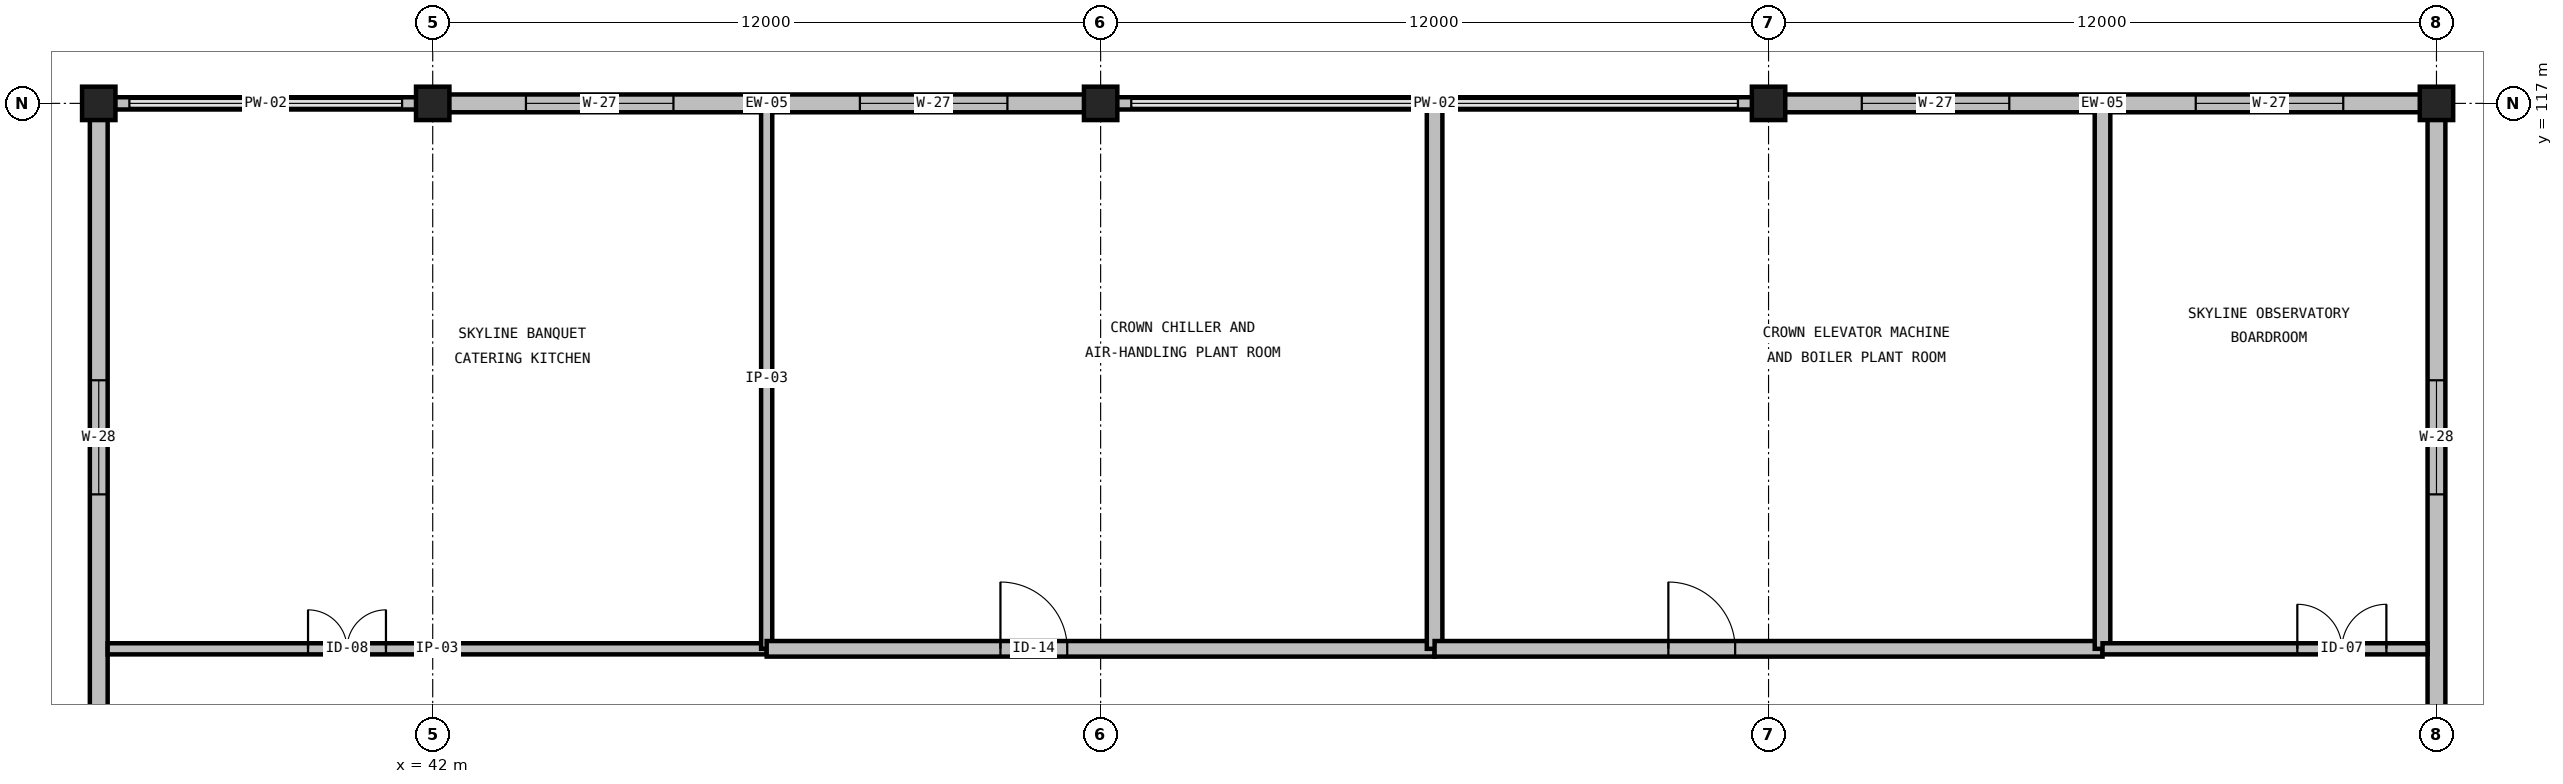
"""IFC4 building model, lengths in metres.
Left out: names, types, materials, properties, quantities, classifications, styles, units other than length and angle.
Written with IfcOpenShell. Run it as: python <this file> out.ifc"""

import sys

from ifc_helpers import new_model, si_unit, direction, frame, frame_2d, origin, origin_2d, place, context, subcontext, project, spatial, rectangle, extrude, element, fill, save


model = new_model("IFC4")
c1 = context("Model", 3, precision=1e-05, world=origin(), true_north=direction((0.0, 1.0)))
c2 = subcontext(c1, "Body", "Model", "MODEL_VIEW")
j1 = project(units=[si_unit("LENGTHUNIT", "METRE"), si_unit("PLANEANGLEUNIT", "RADIAN")], contexts=[c1])
p1 = place(None, origin())
s1 = spatial("IfcSite", under=j1, at=p1, CompositionType="ELEMENT")
p2 = place(p1, origin())
s2 = spatial("IfcBuilding", under=s1, at=p2, CompositionType="ELEMENT")
p3 = place(p2, frame((0.0, 0.0, 70.8)))
s3 = spatial("IfcBuildingStorey", under=s2, at=p3, CompositionType="ELEMENT", Elevation=70.8)
for number, where, z_axis, x_axis in (
    (1, (36.0, 117.0, 0.0), (0.0, 0.0, 1.0), (1.0, 0.0, 0.0)),
    (2, (42.0, 117.0, 0.0), (0.0, 0.0, 1.0), (1.0, 0.0, 0.0)),
    (3, (54.0, 117.0, 0.0), (0.0, 0.0, 1.0), (1.0, 0.0, 0.0)),
    (4, (66.0, 117.0, 0.0), (0.0, 0.0, 1.0), (1.0, 0.0, 0.0)),
    (5, (78.0, 117.0, 0.0), (0.0, 0.0, 1.0), (1.0, 0.0, 0.0)),
):
    element("IfcColumn", number, at=place(p3, frame(where, z_axis=z_axis, x_axis=x_axis)), inside=s3, PredefinedType="COLUMN", context=c2, shape_type="SweptSolid", body=[
        extrude(rectangle(XDim=0.6, YDim=0.6, at=origin_2d()), origin(), (0.0, 0.0, 1.0), 4.8),
    ])
p4 = place(p3, frame((42.0, 117.0, 0.0), z_axis=(0.0, 0.0, 1.0), x_axis=(-1.0, 0.0, 0.0)))
e6 = element("IfcWall", 6, at=p4, inside=s3, PredefinedType="PARAPET", context=c2, shape_type="SweptSolid", body=[
    extrude(rectangle(XDim=6.0, YDim=0.22, at=frame_2d((3.0, 0.0))), origin(), (0.0, 0.0, 1.0), 0.2),
])
p5 = place(p3, frame((54.0, 117.0, 0.0), z_axis=(0.0, 0.0, 1.0), x_axis=(-1.0, 0.0, 0.0)))
e7 = element("IfcWall", 7, at=p5, inside=s3, PredefinedType="STANDARD", context=c2, shape_type="SweptSolid", body=[
    extrude(rectangle(XDim=12.0, YDim=0.32, at=frame_2d((6.0, 0.0))), origin(), (0.0, 0.0, 1.0), 3.726),
])
p6 = place(p5, frame((1.675, 0.0, 0.8)))
e8 = element("IfcOpeningElement", 8, at=p6, cuts=e7, PredefinedType="OPENING", context=c2, shape_type="SweptSolid", body=[
    extrude(rectangle(XDim=2.65, YDim=2.1, at=frame_2d((1.325, 1.05))), frame((0.0, 0.175, 0.0), z_axis=(0.0, -1.0, 0.0), x_axis=(1.0, 0.0, 0.0)), (0.0, 0.0, 1.0), 0.35),
])
p7 = place(p5, frame((7.675, 0.0, 0.8)))
e9 = element("IfcOpeningElement", 9, at=p7, cuts=e7, PredefinedType="OPENING", context=c2, shape_type="SweptSolid", body=[
    extrude(rectangle(XDim=2.65, YDim=2.1, at=frame_2d((1.325, 1.05))), frame((0.0, 0.175, 0.0), z_axis=(0.0, -1.0, 0.0), x_axis=(1.0, 0.0, 0.0)), (0.0, 0.0, 1.0), 0.35),
])
p8 = place(p3, frame((66.0, 117.0, 0.0), z_axis=(0.0, 0.0, 1.0), x_axis=(-1.0, 0.0, 0.0)))
e10 = element("IfcWall", 10, at=p8, inside=s3, PredefinedType="PARAPET", context=c2, shape_type="SweptSolid", body=[
    extrude(rectangle(XDim=12.0, YDim=0.22, at=frame_2d((6.0, 0.0))), origin(), (0.0, 0.0, 1.0), 0.2),
])
p9 = place(p3, frame((78.0, 117.0, 0.0), z_axis=(0.0, 0.0, 1.0), x_axis=(-1.0, 0.0, 0.0)))
e11 = element("IfcWall", 11, at=p9, inside=s3, PredefinedType="STANDARD", context=c2, shape_type="SweptSolid", body=[
    extrude(rectangle(XDim=12.0, YDim=0.32, at=frame_2d((6.0, 0.0))), origin(), (0.0, 0.0, 1.0), 3.726),
])
p10 = place(p9, frame((1.675, 0.0, 0.8)))
e12 = element("IfcOpeningElement", 12, at=p10, cuts=e11, PredefinedType="OPENING", context=c2, shape_type="SweptSolid", body=[
    extrude(rectangle(XDim=2.65, YDim=2.1, at=frame_2d((1.325, 1.05))), frame((0.0, 0.175, 0.0), z_axis=(0.0, -1.0, 0.0), x_axis=(1.0, 0.0, 0.0)), (0.0, 0.0, 1.0), 0.35),
])
p11 = place(p9, frame((7.675, 0.0, 0.8)))
e13 = element("IfcOpeningElement", 13, at=p11, cuts=e11, PredefinedType="OPENING", context=c2, shape_type="SweptSolid", body=[
    extrude(rectangle(XDim=2.65, YDim=2.1, at=frame_2d((1.325, 1.05))), frame((0.0, 0.175, 0.0), z_axis=(0.0, -1.0, 0.0), x_axis=(1.0, 0.0, 0.0)), (0.0, 0.0, 1.0), 0.35),
])
p12 = place(p3, frame((36.0, 117.0, 0.0), z_axis=(0.0, 0.0, 1.0), x_axis=(0.0, -1.0, 0.0)))
e14 = element("IfcWall", 14, at=p12, inside=s3, PredefinedType="STANDARD", context=c2, shape_type="SweptSolid", body=[
    extrude(rectangle(XDim=12.0, YDim=0.32, at=frame_2d((6.0, 0.0))), origin(), (0.0, 0.0, 1.0), 4.171),
])
p13 = place(p12, frame((4.975, 0.0, 0.85)))
e15 = element("IfcOpeningElement", 15, at=p13, cuts=e14, PredefinedType="OPENING", context=c2, shape_type="SweptSolid", body=[
    extrude(rectangle(XDim=2.05, YDim=2.1, at=frame_2d((1.025, 1.05))), frame((0.0, 0.175, 0.0), z_axis=(0.0, -1.0, 0.0), x_axis=(1.0, 0.0, 0.0)), (0.0, 0.0, 1.0), 0.35),
])
p14 = place(p3, frame((78.0, 105.0, 0.0), z_axis=(0.0, 0.0, 1.0), x_axis=(0.0, 1.0, 0.0)))
e16 = element("IfcWall", 16, at=p14, inside=s3, PredefinedType="STANDARD", context=c2, shape_type="SweptSolid", body=[
    extrude(rectangle(XDim=12.0, YDim=0.32, at=frame_2d((6.0, 0.0))), origin(), (0.0, 0.0, 1.0), 4.171),
])
p15 = place(p14, frame((4.975, 0.0, 0.85)))
e17 = element("IfcOpeningElement", 17, at=p15, cuts=e16, PredefinedType="OPENING", context=c2, shape_type="SweptSolid", body=[
    extrude(rectangle(XDim=2.05, YDim=2.1, at=frame_2d((1.025, 1.05))), frame((0.0, 0.175, 0.0), z_axis=(0.0, -1.0, 0.0), x_axis=(1.0, 0.0, 0.0)), (0.0, 0.0, 1.0), 0.35),
])
p16 = place(p3, frame((77.86, 84.28, 4.8), z_axis=(0.0, 0.0, 1.0), x_axis=(0.0, 1.0, 0.0)))
e18 = element("IfcWall", 18, at=p16, inside=s3, PredefinedType="PARAPET", context=c2, shape_type="SweptSolid", body=[
    extrude(rectangle(XDim=32.44, YDim=0.28, at=frame_2d((16.22, 0.0))), origin(), (0.0, 0.0, 1.0), 1.2),
])
p17 = place(p3, frame((78.0, 116.86, 4.8), z_axis=(0.0, 0.0, 1.0), x_axis=(-1.0, 0.0, 0.0)))
e19 = element("IfcWall", 19, at=p17, inside=s3, PredefinedType="PARAPET", context=c2, shape_type="SweptSolid", body=[
    extrude(rectangle(XDim=42.0, YDim=0.28, at=frame_2d((21.0, 0.0))), origin(), (0.0, 0.0, 1.0), 1.2),
])
p18 = place(p3, frame((36.14, 116.72, 4.8), z_axis=(0.0, 0.0, 1.0), x_axis=(0.0, -1.0, 0.0)))
e20 = element("IfcWall", 20, at=p18, inside=s3, PredefinedType="PARAPET", context=c2, shape_type="SweptSolid", body=[
    extrude(rectangle(XDim=32.44, YDim=0.28, at=frame_2d((16.22, 0.0))), origin(), (0.0, 0.0, 1.0), 1.2),
])
p19 = place(p3, frame((36.16, 107.2, 0.0), z_axis=(0.0, 0.0, 1.0), x_axis=(1.0, 0.0, 0.0)))
e21 = element("IfcWall", 21, at=p19, inside=s3, PredefinedType="PARTITIONING", context=c2, shape_type="SweptSolid", body=[
    extrude(rectangle(XDim=11.84, YDim=0.2, at=frame_2d((5.92, 0.0))), origin(), (0.0, 0.0, 1.0), 4.48),
])
p20 = place(p19, frame((3.6, 0.0, 0.0)))
e22 = element("IfcOpeningElement", 22, at=p20, cuts=e21, PredefinedType="OPENING", context=c2, shape_type="SweptSolid", body=[
    extrude(rectangle(XDim=1.4, YDim=2.2, at=frame_2d((0.7, 1.1))), frame((0.0, 0.115, 0.0), z_axis=(0.0, -1.0, 0.0), x_axis=(1.0, 0.0, 0.0)), (0.0, 0.0, 1.0), 0.23),
])
p21 = place(p3, frame((48.0, 107.2, 0.0), z_axis=(0.0, 0.0, 1.0), x_axis=(0.0, 1.0, 0.0)))
e23 = element("IfcWall", 23, at=p21, inside=s3, PredefinedType="PARTITIONING", context=c2, shape_type="SweptSolid", body=[
    extrude(rectangle(XDim=9.715, YDim=0.2, at=frame_2d((4.857, 0.0))), origin(), (0.0, 0.0, 1.0), 4.48),
])
p22 = place(p3, frame((48.0, 107.2, 0.0), z_axis=(0.0, 0.0, 1.0), x_axis=(1.0, 0.0, 0.0)))
e24 = element("IfcWall", 24, at=p22, inside=s3, PredefinedType="PARTITIONING", context=c2, shape_type="SweptSolid", body=[
    extrude(rectangle(XDim=12.0, YDim=0.28, at=frame_2d((6.0, 0.0))), origin(), (0.0, 0.0, 1.0), 4.48),
])
p23 = place(p22, frame((4.2, 0.0, 0.0)))
e25 = element("IfcOpeningElement", 25, at=p23, cuts=e24, PredefinedType="OPENING", context=c2, shape_type="SweptSolid", body=[
    extrude(rectangle(XDim=1.2, YDim=2.2, at=frame_2d((0.6, 1.1))), frame((0.0, 0.155, 0.0), z_axis=(0.0, -1.0, 0.0), x_axis=(1.0, 0.0, 0.0)), (0.0, 0.0, 1.0), 0.31),
])
p24 = place(p3, frame((60.0, 107.2, 0.0), z_axis=(0.0, 0.0, 1.0), x_axis=(0.0, 1.0, 0.0)))
e26 = element("IfcWall", 26, at=p24, inside=s3, PredefinedType="PARTITIONING", context=c2, shape_type="SweptSolid", body=[
    extrude(rectangle(XDim=9.715, YDim=0.28, at=frame_2d((4.857, 0.0))), origin(), (0.0, 0.0, 1.0), 4.48),
])
p25 = place(p3, frame((60.0, 107.2, 0.0), z_axis=(0.0, 0.0, 1.0), x_axis=(1.0, 0.0, 0.0)))
e27 = element("IfcWall", 27, at=p25, inside=s3, PredefinedType="PARTITIONING", context=c2, shape_type="SweptSolid", body=[
    extrude(rectangle(XDim=12.0, YDim=0.28, at=frame_2d((6.0, 0.0))), origin(), (0.0, 0.0, 1.0), 4.48),
])
p26 = place(p25, frame((4.2, 0.0, 0.0)))
e28 = element("IfcOpeningElement", 28, at=p26, cuts=e27, PredefinedType="OPENING", context=c2, shape_type="SweptSolid", body=[
    extrude(rectangle(XDim=1.2, YDim=2.2, at=frame_2d((0.6, 1.1))), frame((0.0, 0.155, 0.0), z_axis=(0.0, -1.0, 0.0), x_axis=(1.0, 0.0, 0.0)), (0.0, 0.0, 1.0), 0.31),
])
p27 = place(p3, frame((72.0, 107.2, 0.0), z_axis=(0.0, 0.0, 1.0), x_axis=(0.0, 1.0, 0.0)))
e29 = element("IfcWall", 29, at=p27, inside=s3, PredefinedType="PARTITIONING", context=c2, shape_type="SweptSolid", body=[
    extrude(rectangle(XDim=9.715, YDim=0.28, at=frame_2d((4.857, 0.0))), origin(), (0.0, 0.0, 1.0), 4.48),
])
p28 = place(p3, frame((72.0, 107.2, 0.0), z_axis=(0.0, 0.0, 1.0), x_axis=(1.0, 0.0, 0.0)))
e30 = element("IfcWall", 30, at=p28, inside=s3, PredefinedType="PARTITIONING", context=c2, shape_type="SweptSolid", body=[
    extrude(rectangle(XDim=5.84, YDim=0.2, at=frame_2d((2.92, 0.0))), origin(), (0.0, 0.0, 1.0), 4.48),
])
p29 = place(p28, frame((3.5, 0.0, 0.0)))
e31 = element("IfcOpeningElement", 31, at=p29, cuts=e30, PredefinedType="OPENING", context=c2, shape_type="SweptSolid", body=[
    extrude(rectangle(XDim=1.6, YDim=2.25, at=frame_2d((0.8, 1.125))), frame((0.0, 0.115, 0.0), z_axis=(0.0, -1.0, 0.0), x_axis=(1.0, 0.0, 0.0)), (0.0, 0.0, 1.0), 0.23),
])
p30 = place(p6, origin())
e32 = element("IfcWindow", 32, at=p30, inside=s3, PartitioningType="DOUBLE_PANEL_VERTICAL", PredefinedType="WINDOW", context=c2, shape_type="SweptSolid", body=[
    extrude(rectangle(XDim=2.65, YDim=2.1, at=frame_2d((1.325, 1.05))), frame((0.0, 0.03, 0.0), z_axis=(0.0, -1.0, 0.0), x_axis=(1.0, 0.0, 0.0)), (0.0, 0.0, 1.0), 0.06),
])
fill(e8, e32)
p31 = place(p7, origin())
e33 = element("IfcWindow", 33, at=p31, inside=s3, PartitioningType="DOUBLE_PANEL_VERTICAL", PredefinedType="WINDOW", context=c2, shape_type="SweptSolid", body=[
    extrude(rectangle(XDim=2.65, YDim=2.1, at=frame_2d((1.325, 1.05))), frame((0.0, 0.03, 0.0), z_axis=(0.0, -1.0, 0.0), x_axis=(1.0, 0.0, 0.0)), (0.0, 0.0, 1.0), 0.06),
])
fill(e9, e33)
p32 = place(p10, origin())
e34 = element("IfcWindow", 34, at=p32, inside=s3, PartitioningType="DOUBLE_PANEL_VERTICAL", PredefinedType="WINDOW", context=c2, shape_type="SweptSolid", body=[
    extrude(rectangle(XDim=2.65, YDim=2.1, at=frame_2d((1.325, 1.05))), frame((0.0, 0.03, 0.0), z_axis=(0.0, -1.0, 0.0), x_axis=(1.0, 0.0, 0.0)), (0.0, 0.0, 1.0), 0.06),
])
fill(e12, e34)
p33 = place(p11, origin())
e35 = element("IfcWindow", 35, at=p33, inside=s3, PartitioningType="DOUBLE_PANEL_VERTICAL", PredefinedType="WINDOW", context=c2, shape_type="SweptSolid", body=[
    extrude(rectangle(XDim=2.65, YDim=2.1, at=frame_2d((1.325, 1.05))), frame((0.0, 0.03, 0.0), z_axis=(0.0, -1.0, 0.0), x_axis=(1.0, 0.0, 0.0)), (0.0, 0.0, 1.0), 0.06),
])
fill(e13, e35)
p34 = place(p13, origin())
e36 = element("IfcWindow", 36, at=p34, inside=s3, PartitioningType="DOUBLE_PANEL_VERTICAL", PredefinedType="WINDOW", context=c2, shape_type="SweptSolid", body=[
    extrude(rectangle(XDim=2.05, YDim=2.1, at=frame_2d((1.025, 1.05))), frame((0.0, 0.03, 0.0), z_axis=(0.0, -1.0, 0.0), x_axis=(1.0, 0.0, 0.0)), (0.0, 0.0, 1.0), 0.06),
])
fill(e15, e36)
p35 = place(p15, origin())
e37 = element("IfcWindow", 37, at=p35, inside=s3, PartitioningType="DOUBLE_PANEL_VERTICAL", PredefinedType="WINDOW", context=c2, shape_type="SweptSolid", body=[
    extrude(rectangle(XDim=2.05, YDim=2.1, at=frame_2d((1.025, 1.05))), frame((0.0, 0.03, 0.0), z_axis=(0.0, -1.0, 0.0), x_axis=(1.0, 0.0, 0.0)), (0.0, 0.0, 1.0), 0.06),
])
fill(e17, e37)
p36 = place(p20, origin())
e38 = element("IfcDoor", 38, at=p36, inside=s3, OperationType="DOUBLE_DOOR_SINGLE_SWING", PredefinedType="DOOR", context=c2, shape_type="SweptSolid", body=[
    extrude(rectangle(XDim=1.4, YDim=2.2, at=frame_2d((0.7, 1.1))), frame((0.0, 0.025, 0.0), z_axis=(0.0, -1.0, 0.0), x_axis=(1.0, 0.0, 0.0)), (0.0, 0.0, 1.0), 0.05),
])
fill(e22, e38)
p37 = place(p23, origin())
e39 = element("IfcDoor", 39, at=p37, inside=s3, OperationType="SINGLE_SWING_LEFT", PredefinedType="DOOR", context=c2, shape_type="SweptSolid", body=[
    extrude(rectangle(XDim=1.2, YDim=2.2, at=frame_2d((0.6, 1.1))), frame((0.0, 0.025, 0.0), z_axis=(0.0, -1.0, 0.0), x_axis=(1.0, 0.0, 0.0)), (0.0, 0.0, 1.0), 0.05),
])
fill(e25, e39)
p38 = place(p26, origin())
e40 = element("IfcDoor", 40, at=p38, inside=s3, OperationType="SINGLE_SWING_LEFT", PredefinedType="DOOR", context=c2, shape_type="SweptSolid", body=[
    extrude(rectangle(XDim=1.2, YDim=2.2, at=frame_2d((0.6, 1.1))), frame((0.0, 0.025, 0.0), z_axis=(0.0, -1.0, 0.0), x_axis=(1.0, 0.0, 0.0)), (0.0, 0.0, 1.0), 0.05),
])
fill(e28, e40)
p39 = place(p29, origin())
e41 = element("IfcDoor", 41, at=p39, inside=s3, OperationType="DOUBLE_DOOR_SINGLE_SWING", PredefinedType="DOOR", context=c2, shape_type="SweptSolid", body=[
    extrude(rectangle(XDim=1.6, YDim=2.25, at=frame_2d((0.8, 1.125))), frame((0.0, 0.025, 0.0), z_axis=(0.0, -1.0, 0.0), x_axis=(1.0, 0.0, 0.0)), (0.0, 0.0, 1.0), 0.05),
])
fill(e31, e41)
p40 = place(p3, frame((0.0, 0.0, 4.48)))
p41 = place(p40, frame((48.5, 110.5, 0.0)))
p42 = place(p41, frame((0.0, 0.0, 0.27)))
e42 = element("IfcDoor", 42, at=p42, inside=s3, OperationType="SINGLE_SWING_LEFT", PredefinedType="TRAPDOOR", context=c2, shape_type="SweptSolid", body=[
    extrude(rectangle(XDim=1.0, YDim=1.0, at=origin_2d()), origin(), (0.0, 0.0, 1.0), 0.05),
])
p43 = place(p40, frame((52.5, 110.5, 0.0)))
p44 = place(p43, frame((0.0, 0.0, 0.27)))
e43 = element("IfcDoor", 43, at=p44, inside=s3, OperationType="SINGLE_SWING_LEFT", PredefinedType="TRAPDOOR", context=c2, shape_type="SweptSolid", body=[
    extrude(rectangle(XDim=1.0, YDim=1.0, at=origin_2d()), origin(), (0.0, 0.0, 1.0), 0.05),
])
p45 = place(p40, frame((56.5, 110.5, 0.0)))
p46 = place(p45, frame((0.0, 0.0, 0.27)))
e44 = element("IfcDoor", 44, at=p46, inside=s3, OperationType="SINGLE_SWING_LEFT", PredefinedType="TRAPDOOR", context=c2, shape_type="SweptSolid", body=[
    extrude(rectangle(XDim=1.0, YDim=1.0, at=origin_2d()), origin(), (0.0, 0.0, 1.0), 0.05),
])
p47 = place(p40, frame((60.5, 110.5, 0.0)))
p48 = place(p47, frame((0.0, 0.0, 0.27)))
e45 = element("IfcDoor", 45, at=p48, inside=s3, OperationType="SINGLE_SWING_LEFT", PredefinedType="TRAPDOOR", context=c2, shape_type="SweptSolid", body=[
    extrude(rectangle(XDim=1.0, YDim=1.0, at=origin_2d()), origin(), (0.0, 0.0, 1.0), 0.05),
])
p49 = place(p40, frame((64.5, 110.5, 0.0)))
p50 = place(p49, frame((0.0, 0.0, 0.27)))
e46 = element("IfcDoor", 46, at=p50, inside=s3, OperationType="SINGLE_SWING_LEFT", PredefinedType="TRAPDOOR", context=c2, shape_type="SweptSolid", body=[
    extrude(rectangle(XDim=1.0, YDim=1.0, at=origin_2d()), origin(), (0.0, 0.0, 1.0), 0.05),
])
save(model, sys.argv[1])
